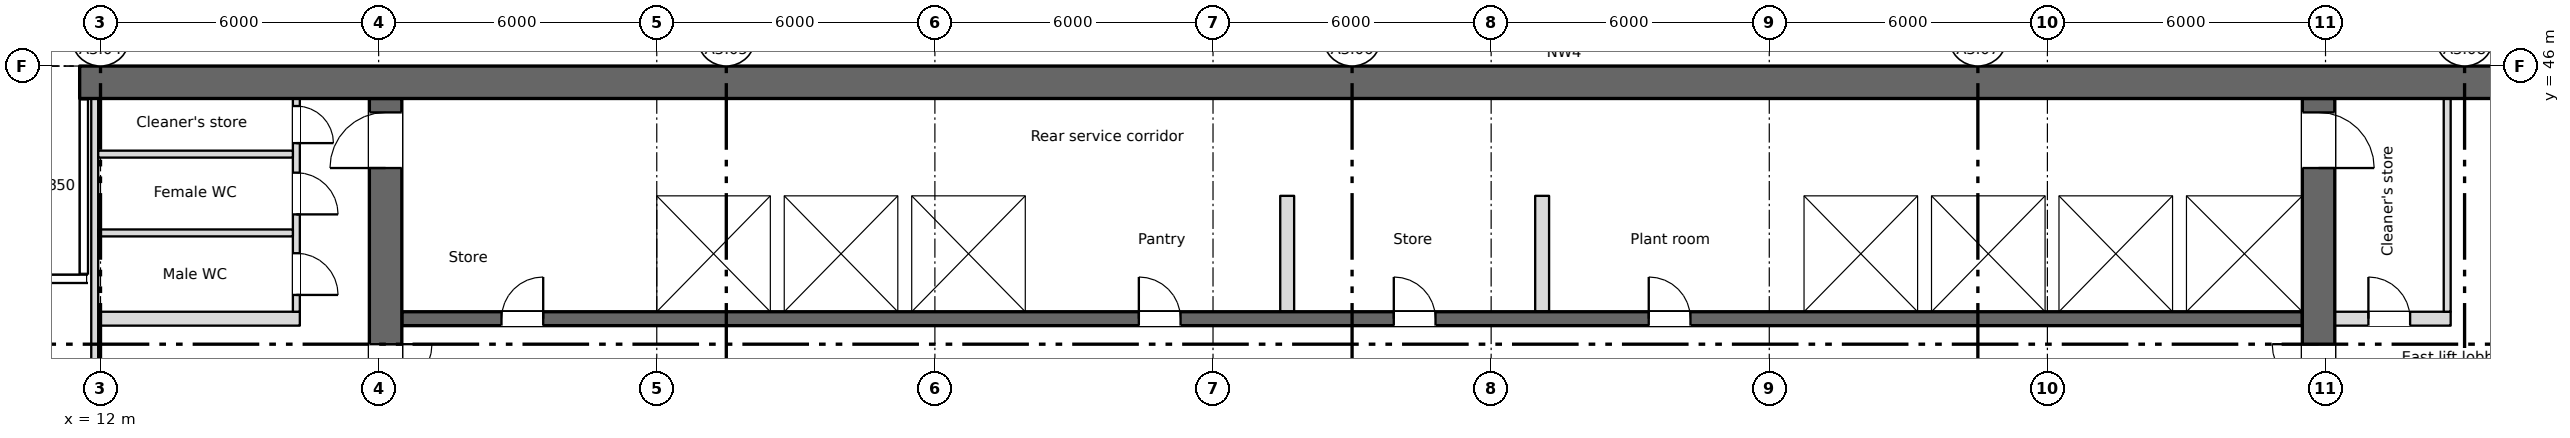
"""IFC4 building model, lengths in metres.
Left out: names, types, materials, properties, quantities, classifications, styles, units other than length and angle.
Written with IfcOpenShell. Run it as: python <this file> out.ifc"""

import sys

from ifc_helpers import new_model, si_unit, direction, frame, frame_2d, origin, place, context, subcontext, project, spatial, rectangle, extrude, element, fill, save


model = new_model("IFC4")
c1 = context("Model", 3, precision=1e-05, world=origin(), true_north=direction((0.0, 1.0)))
c2 = subcontext(c1, "Body", "Model", "MODEL_VIEW")
j1 = project(units=[si_unit("LENGTHUNIT", "METRE"), si_unit("PLANEANGLEUNIT", "RADIAN")], contexts=[c1])
p1 = place(None, origin())
s1 = spatial("IfcSite", under=j1, at=p1, CompositionType="ELEMENT")
p2 = place(p1, origin())
s2 = spatial("IfcBuilding", under=s1, at=p2, CompositionType="ELEMENT")
p3 = place(p2, frame((0.0, 0.0, 204.25)))
s3 = spatial("IfcBuildingStorey", under=s2, at=p3, CompositionType="ELEMENT", Elevation=204.25)
p4 = place(p3, frame((11.55, 45.65, 0.0), z_axis=(0.0, 0.0, 1.0), x_axis=(1.0, 0.0, 0.0)))
e1 = element("IfcWall", 1, at=p4, inside=s3, PredefinedType="SHEAR", context=c2, shape_type="SweptSolid", body=[
    extrude(rectangle(XDim=54.9, YDim=0.7, at=frame_2d((27.45, 0.0))), origin(), (0.0, 0.0, 1.0), 3.35),
])
p5 = place(p3, frame((18.15, 28.4, 0.0), z_axis=(0.0, 0.0, 1.0), x_axis=(0.0, 1.0, 0.0)))
e2 = element("IfcWall", 2, at=p5, inside=s3, PredefinedType="SHEAR", context=c2, shape_type="SweptSolid", body=[
    extrude(rectangle(XDim=16.9, YDim=0.7, at=frame_2d((8.45, 0.0))), origin(), (0.0, 0.0, 1.0), 3.35),
])
p6 = place(p5, frame((9.6, 0.0, 0.0)))
e3 = element("IfcOpeningElement", 3, at=p6, cuts=e2, PredefinedType="OPENING", context=c2, shape_type="SweptSolid", body=[
    extrude(rectangle(XDim=2.0, YDim=2.1, at=frame_2d((1.0, 1.05))), frame((0.0, 0.36, 0.0), z_axis=(0.0, -1.0, 0.0), x_axis=(1.0, 0.0, 0.0)), (0.0, 0.0, 1.0), 0.72),
])
p7 = place(p5, frame((15.4, 0.0, 0.0)))
e4 = element("IfcOpeningElement", 4, at=p7, cuts=e2, PredefinedType="OPENING", context=c2, shape_type="SweptSolid", body=[
    extrude(rectangle(XDim=1.2, YDim=2.1, at=frame_2d((0.6, 1.05))), frame((0.0, 0.36, 0.0), z_axis=(0.0, -1.0, 0.0), x_axis=(1.0, 0.0, 0.0)), (0.0, 0.0, 1.0), 0.72),
])
p8 = place(p3, frame((59.85, 28.4, 0.0), z_axis=(0.0, 0.0, 1.0), x_axis=(0.0, 1.0, 0.0)))
e5 = element("IfcWall", 5, at=p8, inside=s3, PredefinedType="SHEAR", context=c2, shape_type="SweptSolid", body=[
    extrude(rectangle(XDim=16.9, YDim=0.7, at=frame_2d((8.45, 0.0))), origin(), (0.0, 0.0, 1.0), 3.35),
])
p9 = place(p8, frame((9.6, 0.0, 0.0)))
e6 = element("IfcOpeningElement", 6, at=p9, cuts=e5, PredefinedType="OPENING", context=c2, shape_type="SweptSolid", body=[
    extrude(rectangle(XDim=2.0, YDim=2.1, at=frame_2d((1.0, 1.05))), frame((0.0, 0.36, 0.0), z_axis=(0.0, -1.0, 0.0), x_axis=(1.0, 0.0, 0.0)), (0.0, 0.0, 1.0), 0.72),
])
p10 = place(p8, frame((15.4, 0.0, 0.0)))
e7 = element("IfcOpeningElement", 7, at=p10, cuts=e5, PredefinedType="OPENING", context=c2, shape_type="SweptSolid", body=[
    extrude(rectangle(XDim=1.2, YDim=2.1, at=frame_2d((0.6, 1.05))), frame((0.0, 0.36, 0.0), z_axis=(0.0, -1.0, 0.0), x_axis=(1.0, 0.0, 0.0)), (0.0, 0.0, 1.0), 0.72),
])
p11 = place(p3, frame((18.5, 40.55, 0.0), z_axis=(0.0, 0.0, 1.0), x_axis=(1.0, 0.0, 0.0)))
e8 = element("IfcWall", 8, at=p11, inside=s3, PredefinedType="SHEAR", context=c2, shape_type="SweptSolid", body=[
    extrude(rectangle(XDim=41.0, YDim=0.3, at=frame_2d((20.5, 0.0))), origin(), (0.0, 0.0, 1.0), 3.35),
])
p12 = place(p11, frame((2.15, 0.0, 0.0)))
e9 = element("IfcOpeningElement", 9, at=p12, cuts=e8, PredefinedType="OPENING", context=c2, shape_type="SweptSolid", body=[
    extrude(rectangle(XDim=0.9, YDim=2.1, at=frame_2d((0.45, 1.05))), frame((0.0, 0.16, 0.0), z_axis=(0.0, -1.0, 0.0), x_axis=(1.0, 0.0, 0.0)), (0.0, 0.0, 1.0), 0.32),
])
p13 = place(p11, frame((15.9, 0.0, 0.0)))
e10 = element("IfcOpeningElement", 10, at=p13, cuts=e8, PredefinedType="OPENING", context=c2, shape_type="SweptSolid", body=[
    extrude(rectangle(XDim=0.9, YDim=2.1, at=frame_2d((0.45, 1.05))), frame((0.0, 0.16, 0.0), z_axis=(0.0, -1.0, 0.0), x_axis=(1.0, 0.0, 0.0)), (0.0, 0.0, 1.0), 0.32),
])
p14 = place(p11, frame((21.4, 0.0, 0.0)))
e11 = element("IfcOpeningElement", 11, at=p14, cuts=e8, PredefinedType="OPENING", context=c2, shape_type="SweptSolid", body=[
    extrude(rectangle(XDim=0.9, YDim=2.1, at=frame_2d((0.45, 1.05))), frame((0.0, 0.16, 0.0), z_axis=(0.0, -1.0, 0.0), x_axis=(1.0, 0.0, 0.0)), (0.0, 0.0, 1.0), 0.32),
])
p15 = place(p11, frame((26.9, 0.0, 0.0)))
e12 = element("IfcOpeningElement", 12, at=p15, cuts=e8, PredefinedType="OPENING", context=c2, shape_type="SweptSolid", body=[
    extrude(rectangle(XDim=0.9, YDim=2.1, at=frame_2d((0.45, 1.05))), frame((0.0, 0.16, 0.0), z_axis=(0.0, -1.0, 0.0), x_axis=(1.0, 0.0, 0.0)), (0.0, 0.0, 1.0), 0.32),
])
p16 = place(p11, frame((6.175, 0.0, 0.0)))
e13 = element("IfcOpeningElement", 13, at=p16, cuts=e8, PredefinedType="OPENING", context=c2, shape_type="SweptSolid", body=[
    extrude(rectangle(XDim=1.1, YDim=2.1, at=frame_2d((0.55, 1.05))), frame((0.0, 0.16, 0.0), z_axis=(0.0, -1.0, 0.0), x_axis=(1.0, 0.0, 0.0)), (0.0, 0.0, 1.0), 0.32),
])
p17 = place(p11, frame((8.925, 0.0, 0.0)))
e14 = element("IfcOpeningElement", 14, at=p17, cuts=e8, PredefinedType="OPENING", context=c2, shape_type="SweptSolid", body=[
    extrude(rectangle(XDim=1.1, YDim=2.1, at=frame_2d((0.55, 1.05))), frame((0.0, 0.16, 0.0), z_axis=(0.0, -1.0, 0.0), x_axis=(1.0, 0.0, 0.0)), (0.0, 0.0, 1.0), 0.32),
])
p18 = place(p11, frame((11.675, 0.0, 0.0)))
e15 = element("IfcOpeningElement", 15, at=p18, cuts=e8, PredefinedType="OPENING", context=c2, shape_type="SweptSolid", body=[
    extrude(rectangle(XDim=1.1, YDim=2.1, at=frame_2d((0.55, 1.05))), frame((0.0, 0.16, 0.0), z_axis=(0.0, -1.0, 0.0), x_axis=(1.0, 0.0, 0.0)), (0.0, 0.0, 1.0), 0.32),
])
p19 = place(p11, frame((30.925, 0.0, 0.0)))
e16 = element("IfcOpeningElement", 16, at=p19, cuts=e8, PredefinedType="OPENING", context=c2, shape_type="SweptSolid", body=[
    extrude(rectangle(XDim=1.1, YDim=2.1, at=frame_2d((0.55, 1.05))), frame((0.0, 0.16, 0.0), z_axis=(0.0, -1.0, 0.0), x_axis=(1.0, 0.0, 0.0)), (0.0, 0.0, 1.0), 0.32),
])
p20 = place(p11, frame((33.675, 0.0, 0.0)))
e17 = element("IfcOpeningElement", 17, at=p20, cuts=e8, PredefinedType="OPENING", context=c2, shape_type="SweptSolid", body=[
    extrude(rectangle(XDim=1.1, YDim=2.1, at=frame_2d((0.55, 1.05))), frame((0.0, 0.16, 0.0), z_axis=(0.0, -1.0, 0.0), x_axis=(1.0, 0.0, 0.0)), (0.0, 0.0, 1.0), 0.32),
])
p21 = place(p11, frame((36.375, 0.0, 0.0)))
e18 = element("IfcOpeningElement", 18, at=p21, cuts=e8, PredefinedType="OPENING", context=c2, shape_type="SweptSolid", body=[
    extrude(rectangle(XDim=1.2, YDim=2.1, at=frame_2d((0.6, 1.05))), frame((0.0, 0.16, 0.0), z_axis=(0.0, -1.0, 0.0), x_axis=(1.0, 0.0, 0.0)), (0.0, 0.0, 1.0), 0.32),
])
p22 = place(p11, frame((39.15, 0.0, 0.0)))
e19 = element("IfcOpeningElement", 19, at=p22, cuts=e8, PredefinedType="OPENING", context=c2, shape_type="SweptSolid", body=[
    extrude(rectangle(XDim=1.2, YDim=2.1, at=frame_2d((0.6, 1.05))), frame((0.0, 0.16, 0.0), z_axis=(0.0, -1.0, 0.0), x_axis=(1.0, 0.0, 0.0)), (0.0, 0.0, 1.0), 0.32),
])
p23 = place(p3, frame((18.5, 43.35, 0.0), z_axis=(0.0, 0.0, 1.0), x_axis=(1.0, 0.0, 0.0)))
e20 = element("IfcWall", 20, at=p23, inside=s3, PredefinedType="SHEAR", context=c2, shape_type="SweptSolid", body=[
    extrude(rectangle(XDim=41.0, YDim=0.3, at=frame_2d((20.5, 0.0))), origin(), (0.0, 0.0, 1.0), 3.35),
])
p24 = place(p3, frame((11.95, 40.55, 0.0), z_axis=(0.0, 0.0, 1.0), x_axis=(1.0, 0.0, 0.0)))
e21 = element("IfcWall", 21, at=p24, inside=s3, PredefinedType="PARTITIONING", context=c2, shape_type="SweptSolid", body=[
    extrude(rectangle(XDim=4.35, YDim=0.3, at=frame_2d((2.175, 0.0))), origin(), (0.0, 0.0, 1.0), 3.35),
])
p25 = place(p3, frame((60.2, 40.55, 0.0), z_axis=(0.0, 0.0, 1.0), x_axis=(1.0, 0.0, 0.0)))
e22 = element("IfcWall", 22, at=p25, inside=s3, PredefinedType="PARTITIONING", context=c2, shape_type="SweptSolid", body=[
    extrude(rectangle(XDim=2.5, YDim=0.3, at=frame_2d((1.25, 0.0))), origin(), (0.0, 0.0, 1.0), 3.35),
])
p26 = place(p25, frame((0.725, 0.0, 0.0)))
e23 = element("IfcOpeningElement", 23, at=p26, cuts=e22, PredefinedType="OPENING", context=c2, shape_type="SweptSolid", body=[
    extrude(rectangle(XDim=0.9, YDim=2.1, at=frame_2d((0.45, 1.05))), frame((0.0, 0.16, 0.0), z_axis=(0.0, -1.0, 0.0), x_axis=(1.0, 0.0, 0.0)), (0.0, 0.0, 1.0), 0.32),
])
for number, where, z_axis, x_axis in (
    (24, (23.85, 40.7, 0.0), (0.0, 0.0, 1.0), (0.0, 1.0, 0.0)),
    (25, (26.6, 40.7, 0.0), (0.0, 0.0, 1.0), (0.0, 1.0, 0.0)),
    (26, (29.35, 40.7, 0.0), (0.0, 0.0, 1.0), (0.0, 1.0, 0.0)),
    (27, (32.1, 40.7, 0.0), (0.0, 0.0, 1.0), (0.0, 1.0, 0.0)),
    (28, (48.6, 40.7, 0.0), (0.0, 0.0, 1.0), (0.0, 1.0, 0.0)),
    (29, (51.35, 40.7, 0.0), (0.0, 0.0, 1.0), (0.0, 1.0, 0.0)),
    (30, (54.1, 40.7, 0.0), (0.0, 0.0, 1.0), (0.0, 1.0, 0.0)),
    (31, (56.85, 40.7, 0.0), (0.0, 0.0, 1.0), (0.0, 1.0, 0.0)),
):
    element("IfcWall", number, at=place(p3, frame(where, z_axis=z_axis, x_axis=x_axis)), inside=s3, PredefinedType="SHEAR", context=c2, shape_type="SweptSolid", body=[
        extrude(rectangle(XDim=2.5, YDim=0.3, at=frame_2d((1.25, 0.0))), origin(), (0.0, 0.0, 1.0), 3.35),
    ])
p27 = place(p3, frame((16.225, 45.3, 0.0), z_axis=(0.0, 0.0, 1.0), x_axis=(0.0, -1.0, 0.0)))
e32 = element("IfcWall", 32, at=p27, inside=s3, PredefinedType="PARTITIONING", context=c2, shape_type="SweptSolid", body=[
    extrude(rectangle(XDim=4.6, YDim=0.15, at=frame_2d((2.3, 0.0))), origin(), (0.0, 0.0, 1.0), 3.35),
])
p28 = place(p27, frame((3.337, 0.0, 0.0)))
e33 = element("IfcOpeningElement", 33, at=p28, cuts=e32, PredefinedType="OPENING", context=c2, shape_type="SweptSolid", body=[
    extrude(rectangle(XDim=0.9, YDim=2.1, at=frame_2d((0.45, 1.05))), frame((0.0, 0.085, 0.0), z_axis=(0.0, -1.0, 0.0), x_axis=(1.0, 0.0, 0.0)), (0.0, 0.0, 1.0), 0.17),
])
p29 = place(p27, frame((1.6, 0.0, 0.0)))
e34 = element("IfcOpeningElement", 34, at=p29, cuts=e32, PredefinedType="OPENING", context=c2, shape_type="SweptSolid", body=[
    extrude(rectangle(XDim=0.9, YDim=2.1, at=frame_2d((0.45, 1.05))), frame((0.0, 0.085, 0.0), z_axis=(0.0, -1.0, 0.0), x_axis=(1.0, 0.0, 0.0)), (0.0, 0.0, 1.0), 0.17),
])
p30 = place(p27, frame((0.163, 0.0, 0.0)))
e35 = element("IfcOpeningElement", 35, at=p30, cuts=e32, PredefinedType="OPENING", context=c2, shape_type="SweptSolid", body=[
    extrude(rectangle(XDim=0.8, YDim=2.1, at=frame_2d((0.4, 1.05))), frame((0.0, 0.085, 0.0), z_axis=(0.0, -1.0, 0.0), x_axis=(1.0, 0.0, 0.0)), (0.0, 0.0, 1.0), 0.17),
])
p31 = place(p3, frame((62.625, 40.7, 0.0), z_axis=(0.0, 0.0, 1.0), x_axis=(0.0, 1.0, 0.0)))
e36 = element("IfcWall", 36, at=p31, inside=s3, PredefinedType="PARTITIONING", context=c2, shape_type="SweptSolid", body=[
    extrude(rectangle(XDim=4.6, YDim=0.15, at=frame_2d((2.3, 0.0))), origin(), (0.0, 0.0, 1.0), 3.35),
])
p32 = place(p3, frame((11.875, 39.45, 0.0), z_axis=(0.0, 0.0, 1.0), x_axis=(0.0, 1.0, 0.0)))
e37 = element("IfcWall", 37, at=p32, inside=s3, PredefinedType="PARTITIONING", context=c2, shape_type="SweptSolid", body=[
    extrude(rectangle(XDim=5.85, YDim=0.15, at=frame_2d((2.925, 0.0))), origin(), (0.0, 0.0, 1.0), 3.35),
])
for number, where, z_axis, x_axis in (
    (38, (11.95, 42.4, 0.0), (0.0, 0.0, 1.0), (1.0, 0.0, 0.0)),
    (39, (11.95, 44.1, 0.0), (0.0, 0.0, 1.0), (1.0, 0.0, 0.0)),
):
    element("IfcWall", number, at=place(p3, frame(where, z_axis=z_axis, x_axis=x_axis)), inside=s3, PredefinedType="PARTITIONING", context=c2, shape_type="SweptSolid", body=[
        extrude(rectangle(XDim=4.2, YDim=0.15, at=frame_2d((2.1, 0.0))), origin(), (0.0, 0.0, 1.0), 3.35),
    ])
for number, where, z_axis, x_axis in (
    (40, (37.6, 40.7, 0.0), (0.0, 0.0, 1.0), (0.0, 1.0, 0.0)),
    (41, (43.1, 40.7, 0.0), (0.0, 0.0, 1.0), (0.0, 1.0, 0.0)),
):
    element("IfcWall", number, at=place(p3, frame(where, z_axis=z_axis, x_axis=x_axis)), inside=s3, PredefinedType="PARTITIONING", context=c2, shape_type="SweptSolid", body=[
        extrude(rectangle(XDim=2.5, YDim=0.3, at=frame_2d((1.25, 0.0))), origin(), (0.0, 0.0, 1.0), 3.35),
    ])
p33 = place(p26, origin())
e42 = element("IfcDoor", 42, at=p33, inside=s3, OperationType="SINGLE_SWING_LEFT", PredefinedType="DOOR", context=c2, shape_type="SweptSolid", body=[
    extrude(rectangle(XDim=0.9, YDim=2.1, at=frame_2d((0.45, 1.05))), frame((0.0, 0.025, 0.0), z_axis=(0.0, -1.0, 0.0), x_axis=(1.0, 0.0, 0.0)), (0.0, 0.0, 1.0), 0.05),
])
fill(e23, e42)
p34 = place(p28, origin())
e43 = element("IfcDoor", 43, at=p34, inside=s3, OperationType="SINGLE_SWING_RIGHT", PredefinedType="DOOR", context=c2, shape_type="SweptSolid", body=[
    extrude(rectangle(XDim=0.9, YDim=2.1, at=frame_2d((0.45, 1.05))), frame((0.0, 0.025, 0.0), z_axis=(0.0, -1.0, 0.0), x_axis=(1.0, 0.0, 0.0)), (0.0, 0.0, 1.0), 0.05),
])
fill(e33, e43)
p35 = place(p29, origin())
e44 = element("IfcDoor", 44, at=p35, inside=s3, OperationType="SINGLE_SWING_RIGHT", PredefinedType="DOOR", context=c2, shape_type="SweptSolid", body=[
    extrude(rectangle(XDim=0.9, YDim=2.1, at=frame_2d((0.45, 1.05))), frame((0.0, 0.025, 0.0), z_axis=(0.0, -1.0, 0.0), x_axis=(1.0, 0.0, 0.0)), (0.0, 0.0, 1.0), 0.05),
])
fill(e34, e44)
p36 = place(p30, origin())
e45 = element("IfcDoor", 45, at=p36, inside=s3, OperationType="SINGLE_SWING_RIGHT", PredefinedType="DOOR", context=c2, shape_type="SweptSolid", body=[
    extrude(rectangle(XDim=0.8, YDim=2.1, at=frame_2d((0.4, 1.05))), frame((0.0, 0.025, 0.0), z_axis=(0.0, -1.0, 0.0), x_axis=(1.0, 0.0, 0.0)), (0.0, 0.0, 1.0), 0.05),
])
fill(e35, e45)
p37 = place(p12, origin())
e46 = element("IfcDoor", 46, at=p37, inside=s3, OperationType="SINGLE_SWING_RIGHT", PredefinedType="DOOR", context=c2, shape_type="SweptSolid", body=[
    extrude(rectangle(XDim=0.9, YDim=2.1, at=frame_2d((0.45, 1.05))), frame((0.0, 0.025, 0.0), z_axis=(0.0, -1.0, 0.0), x_axis=(1.0, 0.0, 0.0)), (0.0, 0.0, 1.0), 0.05),
])
fill(e9, e46)
p38 = place(p13, origin())
e47 = element("IfcDoor", 47, at=p38, inside=s3, OperationType="SINGLE_SWING_LEFT", PredefinedType="DOOR", context=c2, shape_type="SweptSolid", body=[
    extrude(rectangle(XDim=0.9, YDim=2.1, at=frame_2d((0.45, 1.05))), frame((0.0, 0.025, 0.0), z_axis=(0.0, -1.0, 0.0), x_axis=(1.0, 0.0, 0.0)), (0.0, 0.0, 1.0), 0.05),
])
fill(e10, e47)
p39 = place(p14, origin())
e48 = element("IfcDoor", 48, at=p39, inside=s3, OperationType="SINGLE_SWING_LEFT", PredefinedType="DOOR", context=c2, shape_type="SweptSolid", body=[
    extrude(rectangle(XDim=0.9, YDim=2.1, at=frame_2d((0.45, 1.05))), frame((0.0, 0.025, 0.0), z_axis=(0.0, -1.0, 0.0), x_axis=(1.0, 0.0, 0.0)), (0.0, 0.0, 1.0), 0.05),
])
fill(e11, e48)
p40 = place(p15, origin())
e49 = element("IfcDoor", 49, at=p40, inside=s3, OperationType="SINGLE_SWING_LEFT", PredefinedType="DOOR", context=c2, shape_type="SweptSolid", body=[
    extrude(rectangle(XDim=0.9, YDim=2.1, at=frame_2d((0.45, 1.05))), frame((0.0, 0.025, 0.0), z_axis=(0.0, -1.0, 0.0), x_axis=(1.0, 0.0, 0.0)), (0.0, 0.0, 1.0), 0.05),
])
fill(e12, e49)
p41 = place(p16, origin())
e50 = element("IfcDoor", 50, at=p41, inside=s3, OperationType="SLIDING_TO_LEFT", PredefinedType="DOOR", context=c2, shape_type="SweptSolid", body=[
    extrude(rectangle(XDim=1.1, YDim=2.1, at=frame_2d((0.55, 1.05))), frame((0.0, 0.025, 0.0), z_axis=(0.0, -1.0, 0.0), x_axis=(1.0, 0.0, 0.0)), (0.0, 0.0, 1.0), 0.05),
])
fill(e13, e50)
p42 = place(p17, origin())
e51 = element("IfcDoor", 51, at=p42, inside=s3, OperationType="SLIDING_TO_LEFT", PredefinedType="DOOR", context=c2, shape_type="SweptSolid", body=[
    extrude(rectangle(XDim=1.1, YDim=2.1, at=frame_2d((0.55, 1.05))), frame((0.0, 0.025, 0.0), z_axis=(0.0, -1.0, 0.0), x_axis=(1.0, 0.0, 0.0)), (0.0, 0.0, 1.0), 0.05),
])
fill(e14, e51)
p43 = place(p18, origin())
e52 = element("IfcDoor", 52, at=p43, inside=s3, OperationType="SLIDING_TO_LEFT", PredefinedType="DOOR", context=c2, shape_type="SweptSolid", body=[
    extrude(rectangle(XDim=1.1, YDim=2.1, at=frame_2d((0.55, 1.05))), frame((0.0, 0.025, 0.0), z_axis=(0.0, -1.0, 0.0), x_axis=(1.0, 0.0, 0.0)), (0.0, 0.0, 1.0), 0.05),
])
fill(e15, e52)
p44 = place(p19, origin())
e53 = element("IfcDoor", 53, at=p44, inside=s3, OperationType="SLIDING_TO_LEFT", PredefinedType="DOOR", context=c2, shape_type="SweptSolid", body=[
    extrude(rectangle(XDim=1.1, YDim=2.1, at=frame_2d((0.55, 1.05))), frame((0.0, 0.025, 0.0), z_axis=(0.0, -1.0, 0.0), x_axis=(1.0, 0.0, 0.0)), (0.0, 0.0, 1.0), 0.05),
])
fill(e16, e53)
p45 = place(p20, origin())
e54 = element("IfcDoor", 54, at=p45, inside=s3, OperationType="SLIDING_TO_LEFT", PredefinedType="DOOR", context=c2, shape_type="SweptSolid", body=[
    extrude(rectangle(XDim=1.1, YDim=2.1, at=frame_2d((0.55, 1.05))), frame((0.0, 0.025, 0.0), z_axis=(0.0, -1.0, 0.0), x_axis=(1.0, 0.0, 0.0)), (0.0, 0.0, 1.0), 0.05),
])
fill(e17, e54)
p46 = place(p21, origin())
e55 = element("IfcDoor", 55, at=p46, inside=s3, OperationType="SLIDING_TO_LEFT", PredefinedType="DOOR", context=c2, shape_type="SweptSolid", body=[
    extrude(rectangle(XDim=1.2, YDim=2.1, at=frame_2d((0.6, 1.05))), frame((0.0, 0.025, 0.0), z_axis=(0.0, -1.0, 0.0), x_axis=(1.0, 0.0, 0.0)), (0.0, 0.0, 1.0), 0.05),
])
fill(e18, e55)
p47 = place(p22, origin())
e56 = element("IfcDoor", 56, at=p47, inside=s3, OperationType="SLIDING_TO_LEFT", PredefinedType="DOOR", context=c2, shape_type="SweptSolid", body=[
    extrude(rectangle(XDim=1.2, YDim=2.1, at=frame_2d((0.6, 1.05))), frame((0.0, 0.025, 0.0), z_axis=(0.0, -1.0, 0.0), x_axis=(1.0, 0.0, 0.0)), (0.0, 0.0, 1.0), 0.05),
])
fill(e19, e56)
p48 = place(p6, origin())
e57 = element("IfcDoor", 57, at=p48, inside=s3, OperationType="DOUBLE_DOOR_SINGLE_SWING", PredefinedType="DOOR", context=c2, shape_type="SweptSolid", body=[
    extrude(rectangle(XDim=2.0, YDim=2.1, at=frame_2d((1.0, 1.05))), frame((0.0, 0.025, 0.0), z_axis=(0.0, -1.0, 0.0), x_axis=(1.0, 0.0, 0.0)), (0.0, 0.0, 1.0), 0.05),
])
fill(e3, e57)
p49 = place(p9, origin())
e58 = element("IfcDoor", 58, at=p49, inside=s3, OperationType="DOUBLE_DOOR_SINGLE_SWING", PredefinedType="DOOR", context=c2, shape_type="SweptSolid", body=[
    extrude(rectangle(XDim=2.0, YDim=2.1, at=frame_2d((1.0, 1.05))), frame((0.0, 0.025, 0.0), z_axis=(0.0, -1.0, 0.0), x_axis=(1.0, 0.0, 0.0)), (0.0, 0.0, 1.0), 0.05),
])
fill(e6, e58)
p50 = place(p7, origin())
e59 = element("IfcDoor", 59, at=p50, inside=s3, OperationType="SINGLE_SWING_LEFT", PredefinedType="DOOR", context=c2, shape_type="SweptSolid", body=[
    extrude(rectangle(XDim=1.2, YDim=2.1, at=frame_2d((0.6, 1.05))), frame((0.0, 0.025, 0.0), z_axis=(0.0, -1.0, 0.0), x_axis=(1.0, 0.0, 0.0)), (0.0, 0.0, 1.0), 0.05),
])
fill(e4, e59)
p51 = place(p10, origin())
e60 = element("IfcDoor", 60, at=p51, inside=s3, OperationType="SINGLE_SWING_LEFT", PredefinedType="DOOR", context=c2, shape_type="SweptSolid", body=[
    extrude(rectangle(XDim=1.2, YDim=2.1, at=frame_2d((0.6, 1.05))), frame((0.0, 0.025, 0.0), z_axis=(0.0, -1.0, 0.0), x_axis=(1.0, 0.0, 0.0)), (0.0, 0.0, 1.0), 0.05),
])
fill(e7, e60)
save(model, sys.argv[1])
